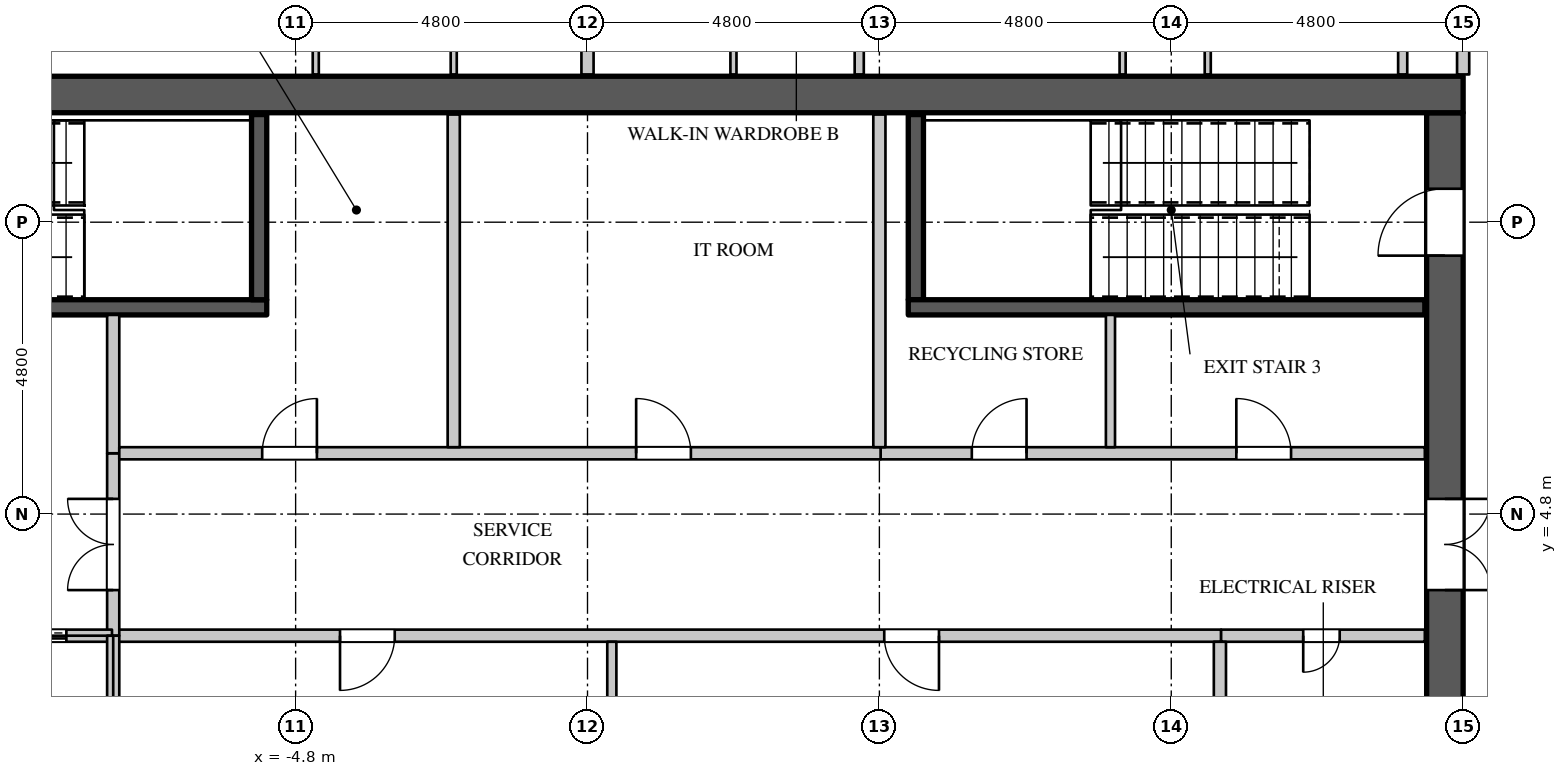
"""IFC4 building model, lengths in metres.
Left out: names, types, materials, properties, quantities, classifications, styles, units other than length and angle.
Written with IfcOpenShell. Run it as: python <this file> out.ifc"""

import sys

from ifc_helpers import new_model, si_unit, direction, frame, frame_2d, origin, place, context, subcontext, project, spatial, rectangle, extrude, element, fill, save


model = new_model("IFC4")
c1 = context("Model", 3, precision=1e-05, world=origin(), true_north=direction((0.0, 1.0)))
c2 = subcontext(c1, "Body", "Model", "MODEL_VIEW")
j1 = project(units=[si_unit("LENGTHUNIT", "METRE"), si_unit("PLANEANGLEUNIT", "RADIAN")], contexts=[c1])
p1 = place(None, origin())
s1 = spatial("IfcSite", under=j1, at=p1, CompositionType="ELEMENT")
p2 = place(p1, origin())
s2 = spatial("IfcBuilding", under=s1, at=p2, CompositionType="ELEMENT")
p3 = place(p2, frame((0.0, 0.0, 281.1)))
s3 = spatial("IfcBuildingStorey", under=s2, at=p3, CompositionType="ELEMENT", Elevation=281.1)
p4 = place(p3, frame((-14.4, 11.7, 0.0), z_axis=(0.0, 0.0, 1.0), x_axis=(1.0, 0.0, 0.0)))
e1 = element("IfcWall", 1, at=p4, inside=s3, PredefinedType="SHEAR", context=c2, shape_type="SweptSolid", body=[
    extrude(rectangle(XDim=28.8, YDim=0.6, at=frame_2d((14.4, 0.0))), origin(), (0.0, 0.0, 1.0), 4.2),
])
p5 = place(p3, frame((14.1, -11.4, 0.0), z_axis=(0.0, 0.0, 1.0), x_axis=(0.0, 1.0, 0.0)))
e2 = element("IfcWall", 2, at=p5, inside=s3, PredefinedType="SHEAR", context=c2, shape_type="SweptSolid", body=[
    extrude(rectangle(XDim=22.8, YDim=0.6, at=frame_2d((11.4, 0.0))), origin(), (0.0, 0.0, 1.0), 4.2),
])
p6 = place(p5, frame((20.45, 0.0, 0.0)))
e3 = element("IfcOpeningElement", 3, at=p6, cuts=e2, PredefinedType="OPENING", context=c2, shape_type="SweptSolid", body=[
    extrude(rectangle(XDim=1.1, YDim=2.2, at=frame_2d((0.55, 1.1))), frame((0.0, 0.31, 0.0), z_axis=(0.0, -1.0, 0.0), x_axis=(1.0, 0.0, 0.0)), (0.0, 0.0, 1.0), 0.62),
])
p7 = place(p5, frame((1.25, 0.0, 0.0)))
e4 = element("IfcOpeningElement", 4, at=p7, cuts=e2, PredefinedType="OPENING", context=c2, shape_type="SweptSolid", body=[
    extrude(rectangle(XDim=1.1, YDim=2.2, at=frame_2d((0.55, 1.1))), frame((0.0, 0.31, 0.0), z_axis=(0.0, -1.0, 0.0), x_axis=(1.0, 0.0, 0.0)), (0.0, 0.0, 1.0), 0.62),
])
p8 = place(p5, frame((14.95, 0.0, 0.0)))
e5 = element("IfcOpeningElement", 5, at=p8, cuts=e2, PredefinedType="OPENING", context=c2, shape_type="SweptSolid", body=[
    extrude(rectangle(XDim=1.5, YDim=2.4, at=frame_2d((0.75, 1.2))), frame((0.0, 0.31, 0.0), z_axis=(0.0, -1.0, 0.0), x_axis=(1.0, 0.0, 0.0)), (0.0, 0.0, 1.0), 0.62),
])
p9 = place(p5, frame((6.35, 0.0, 0.0)))
e6 = element("IfcOpeningElement", 6, at=p9, cuts=e2, PredefinedType="OPENING", context=c2, shape_type="SweptSolid", body=[
    extrude(rectangle(XDim=1.5, YDim=2.4, at=frame_2d((0.75, 1.2))), frame((0.0, 0.31, 0.0), z_axis=(0.0, -1.0, 0.0), x_axis=(1.0, 0.0, 0.0)), (0.0, 0.0, 1.0), 0.62),
])
p10 = place(p3, frame((-7.82, 2.8, 0.0), z_axis=(0.0, 0.0, 1.0), x_axis=(1.0, 0.0, 0.0)))
e7 = element("IfcWall", 7, at=p10, inside=s3, PredefinedType="PARTITIONING", context=c2, shape_type="SweptSolid", body=[
    extrude(rectangle(XDim=18.24, YDim=0.2, at=frame_2d((9.12, 0.0))), origin(), (0.0, 0.0, 1.0), 3.95),
])
p11 = place(p10, frame((3.75, 0.0, 0.0)))
e8 = element("IfcOpeningElement", 8, at=p11, cuts=e7, PredefinedType="OPENING", context=c2, shape_type="SweptSolid", body=[
    extrude(rectangle(XDim=0.9, YDim=2.2, at=frame_2d((0.45, 1.1))), frame((0.0, 0.11, 0.0), z_axis=(0.0, -1.0, 0.0), x_axis=(1.0, 0.0, 0.0)), (0.0, 0.0, 1.0), 0.22),
])
p12 = place(p10, frame((12.7, 0.0, 0.0)))
e9 = element("IfcOpeningElement", 9, at=p12, cuts=e7, PredefinedType="OPENING", context=c2, shape_type="SweptSolid", body=[
    extrude(rectangle(XDim=0.9, YDim=2.2, at=frame_2d((0.45, 1.1))), frame((0.0, 0.11, 0.0), z_axis=(0.0, -1.0, 0.0), x_axis=(1.0, 0.0, 0.0)), (0.0, 0.0, 1.0), 0.22),
])
p13 = place(p3, frame((-7.8, 2.8, 0.0), z_axis=(0.0, 0.0, 1.0), x_axis=(0.0, 1.0, 0.0)))
e10 = element("IfcWall", 10, at=p13, inside=s3, PredefinedType="PARTITIONING", context=c2, shape_type="SweptSolid", body=[
    extrude(rectangle(XDim=3.0, YDim=0.2, at=frame_2d((1.5, 0.0))), origin(), (0.0, 0.0, 1.0), 3.95),
])
p14 = place(p13, frame((0.75, 0.0, 0.0)))
e11 = element("IfcOpeningElement", 11, at=p14, cuts=e10, PredefinedType="OPENING", context=c2, shape_type="SweptSolid", body=[
    extrude(rectangle(XDim=1.5, YDim=2.4, at=frame_2d((0.75, 1.2))), frame((0.0, 0.11, 0.0), z_axis=(0.0, -1.0, 0.0), x_axis=(1.0, 0.0, 0.0)), (0.0, 0.0, 1.0), 0.22),
])
p15 = place(p3, frame((4.82, 5.8, 0.0), z_axis=(0.0, 0.0, 1.0), x_axis=(1.0, 0.0, 0.0)))
e12 = element("IfcWall", 12, at=p15, inside=s3, PredefinedType="PARTITIONING", context=c2, shape_type="SweptSolid", body=[
    extrude(rectangle(XDim=8.95, YDim=0.2, at=frame_2d((4.475, 0.0))), origin(), (0.0, 0.0, 1.0), 3.95),
])
p16 = place(p15, frame((1.5, 0.0, 0.0)))
e13 = element("IfcOpeningElement", 13, at=p16, cuts=e12, PredefinedType="OPENING", context=c2, shape_type="SweptSolid", body=[
    extrude(rectangle(XDim=0.9, YDim=2.2, at=frame_2d((0.45, 1.1))), frame((0.0, 0.11, 0.0), z_axis=(0.0, -1.0, 0.0), x_axis=(1.0, 0.0, 0.0)), (0.0, 0.0, 1.0), 0.22),
])
p17 = place(p15, frame((5.85, 0.0, 0.0)))
e14 = element("IfcOpeningElement", 14, at=p17, cuts=e12, PredefinedType="OPENING", context=c2, shape_type="SweptSolid", body=[
    extrude(rectangle(XDim=0.9, YDim=2.2, at=frame_2d((0.45, 1.1))), frame((0.0, 0.11, 0.0), z_axis=(0.0, -1.0, 0.0), x_axis=(1.0, 0.0, 0.0)), (0.0, 0.0, 1.0), 0.22),
])
p18 = place(p3, frame((14.4, 12.03, 0.0), z_axis=(0.0, 0.0, 1.0), x_axis=(0.0, 1.0, 0.0)))
e15 = element("IfcWall", 15, at=p18, inside=s3, PredefinedType="PARTITIONING", context=c2, shape_type="SweptSolid", body=[
    extrude(rectangle(XDim=2.27, YDim=0.2, at=frame_2d((1.135, 0.0))), origin(), (0.0, 0.0, 1.0), 3.95),
])
p19 = place(p3, frame((0.4, 0.1, 0.0), z_axis=(0.0, 0.0, 1.0), x_axis=(0.0, 1.0, 0.0)))
e16 = element("IfcWall", 16, at=p19, inside=s3, PredefinedType="PARTITIONING", context=c2, shape_type="SweptSolid", body=[
    extrude(rectangle(XDim=2.6, YDim=0.15, at=frame_2d((1.3, 0.0))), origin(), (0.0, 0.0, 1.0), 3.95),
])
p20 = place(p3, frame((4.469, 12.03, 0.0), z_axis=(0.0, 0.0, 1.0), x_axis=(0.0, 1.0, 0.0)))
e17 = element("IfcWall", 17, at=p20, inside=s3, PredefinedType="PARTITIONING", context=c2, shape_type="SweptSolid", body=[
    extrude(rectangle(XDim=13.92, YDim=0.15, at=frame_2d((6.96, 0.0))), origin(), (0.0, 0.0, 1.0), 3.3),
])
p21 = place(p20, frame((9.55, 0.0, 0.0)))
e18 = element("IfcOpeningElement", 18, at=p21, cuts=e17, PredefinedType="OPENING", context=c2, shape_type="SweptSolid", body=[
    extrude(rectangle(XDim=0.95, YDim=2.2, at=frame_2d((0.475, 1.1))), frame((0.0, 0.085, 0.0), z_axis=(0.0, -1.0, 0.0), x_axis=(1.0, 0.0, 0.0)), (0.0, 0.0, 1.0), 0.17),
])
p22 = place(p3, frame((8.6, 5.9, 0.0), z_axis=(0.0, 0.0, 1.0), x_axis=(0.0, 1.0, 0.0)))
e19 = element("IfcWall", 19, at=p22, inside=s3, PredefinedType="PARTITIONING", context=c2, shape_type="SweptSolid", body=[
    extrude(rectangle(XDim=2.175, YDim=0.15, at=frame_2d((1.087, 0.0))), origin(), (0.0, 0.0, 1.0), 3.95),
])
p23 = place(p3, frame((13.406, 12.03, 0.0), z_axis=(0.0, 0.0, 1.0), x_axis=(0.0, 1.0, 0.0)))
e20 = element("IfcWall", 20, at=p23, inside=s3, PredefinedType="PARTITIONING", context=c2, shape_type="SweptSolid", body=[
    extrude(rectangle(XDim=13.701, YDim=0.15, at=frame_2d((6.851, 0.0))), origin(), (0.0, 0.0, 1.0), 3.3),
])
p24 = place(p23, frame((2.5, 0.0, 0.0)))
e21 = element("IfcOpeningElement", 21, at=p24, cuts=e20, PredefinedType="OPENING", context=c2, shape_type="SweptSolid", body=[
    extrude(rectangle(XDim=1.5, YDim=2.2, at=frame_2d((0.75, 1.1))), frame((0.0, 0.085, 0.0), z_axis=(0.0, -1.0, 0.0), x_axis=(1.0, 0.0, 0.0)), (0.0, 0.0, 1.0), 0.17),
])
p25 = place(p3, frame((0.0, 12.03, 0.0), z_axis=(0.0, 0.0, 1.0), x_axis=(0.0, 1.0, 0.0)))
e22 = element("IfcWall", 22, at=p25, inside=s3, PredefinedType="PARTITIONING", context=c2, shape_type="SweptSolid", body=[
    extrude(rectangle(XDim=14.425, YDim=0.2, at=frame_2d((7.212, 0.0))), origin(), (0.0, 0.0, 1.0), 3.95),
])
p26 = place(p3, frame((-7.8, 5.8, 0.0), z_axis=(0.0, 0.0, 1.0), x_axis=(0.0, 1.0, 0.0)))
e23 = element("IfcWall", 23, at=p26, inside=s3, PredefinedType="PARTITIONING", context=c2, shape_type="SweptSolid", body=[
    extrude(rectangle(XDim=2.275, YDim=0.2, at=frame_2d((1.137, 0.0))), origin(), (0.0, 0.0, 1.0), 3.95),
])
p27 = place(p3, frame((-7.7, 5.8, 0.0), z_axis=(0.0, 0.0, 1.0), x_axis=(1.0, 0.0, 0.0)))
e24 = element("IfcWall", 24, at=p27, inside=s3, PredefinedType="PARTITIONING", context=c2, shape_type="SweptSolid", body=[
    extrude(rectangle(XDim=12.52, YDim=0.2, at=frame_2d((6.26, 0.0))), origin(), (0.0, 0.0, 1.0), 3.95),
])
p28 = place(p27, frame((2.35, 0.0, 0.0)))
e25 = element("IfcOpeningElement", 25, at=p28, cuts=e24, PredefinedType="OPENING", context=c2, shape_type="SweptSolid", body=[
    extrude(rectangle(XDim=0.9, YDim=2.2, at=frame_2d((0.45, 1.1))), frame((0.0, 0.11, 0.0), z_axis=(0.0, -1.0, 0.0), x_axis=(1.0, 0.0, 0.0)), (0.0, 0.0, 1.0), 0.22),
])
p29 = place(p27, frame((8.5, 0.0, 0.0)))
e26 = element("IfcOpeningElement", 26, at=p29, cuts=e24, PredefinedType="OPENING", context=c2, shape_type="SweptSolid", body=[
    extrude(rectangle(XDim=0.9, YDim=2.2, at=frame_2d((0.45, 1.1))), frame((0.0, 0.11, 0.0), z_axis=(0.0, -1.0, 0.0), x_axis=(1.0, 0.0, 0.0)), (0.0, 0.0, 1.0), 0.22),
])
for number, where, z_axis, x_axis in (
    (27, (-2.2, 5.9, 0.0), (0.0, 0.0, 1.0), (0.0, 1.0, 0.0)),
    (28, (4.8, 5.9, 0.0), (0.0, 0.0, 1.0), (0.0, 1.0, 0.0)),
):
    element("IfcWall", number, at=place(p3, frame(where, z_axis=z_axis, x_axis=x_axis)), inside=s3, PredefinedType="PARTITIONING", context=c2, shape_type="SweptSolid", body=[
        extrude(rectangle(XDim=5.47, YDim=0.2, at=frame_2d((2.735, 0.0))), origin(), (0.0, 0.0, 1.0), 3.95),
    ])
p30 = place(p3, frame((10.42, 2.8, 0.0), z_axis=(0.0, 0.0, 1.0), x_axis=(1.0, 0.0, 0.0)))
e29 = element("IfcWall", 29, at=p30, inside=s3, PredefinedType="PARTITIONING", context=c2, shape_type="SweptSolid", body=[
    extrude(rectangle(XDim=3.35, YDim=0.2, at=frame_2d((1.675, 0.0))), origin(), (0.0, 0.0, 1.0), 3.95),
])
p31 = place(p30, frame((1.35, 0.0, 0.0)))
e30 = element("IfcOpeningElement", 30, at=p31, cuts=e29, PredefinedType="OPENING", context=c2, shape_type="SweptSolid", body=[
    extrude(rectangle(XDim=0.6, YDim=2.0, at=frame_2d((0.3, 1.0))), frame((0.0, 0.11, 0.0), z_axis=(0.0, -1.0, 0.0), x_axis=(1.0, 0.0, 0.0)), (0.0, 0.0, 1.0), 0.22),
])
p32 = place(p3, frame((10.4, 0.1, 0.0), z_axis=(0.0, 0.0, 1.0), x_axis=(0.0, 1.0, 0.0)))
e31 = element("IfcWall", 31, at=p32, inside=s3, PredefinedType="PARTITIONING", context=c2, shape_type="SweptSolid", body=[
    extrude(rectangle(XDim=2.6, YDim=0.2, at=frame_2d((1.3, 0.0))), origin(), (0.0, 0.0, 1.0), 3.95),
])
p33 = place(p3, frame((-13.77, 2.8, 0.0), z_axis=(0.0, 0.0, 1.0), x_axis=(1.0, 0.0, 0.0)))
e32 = element("IfcWall", 32, at=p33, inside=s3, PredefinedType="PARTITIONING", context=c2, shape_type="SweptSolid", body=[
    extrude(rectangle(XDim=5.95, YDim=0.2, at=frame_2d((2.975, 0.0))), origin(), (0.0, 0.0, 1.0), 3.95),
])
p34 = place(p33, frame((1.1, 0.0, 0.0)))
e33 = element("IfcOpeningElement", 33, at=p34, cuts=e32, PredefinedType="OPENING", context=c2, shape_type="SweptSolid", body=[
    extrude(rectangle(XDim=1.1, YDim=2.2, at=frame_2d((0.55, 1.1))), frame((0.0, 0.11, 0.0), z_axis=(0.0, -1.0, 0.0), x_axis=(1.0, 0.0, 0.0)), (0.0, 0.0, 1.0), 0.22),
])
p35 = place(p33, frame((4.1, 0.0, 0.0)))
e34 = element("IfcOpeningElement", 34, at=p35, cuts=e32, PredefinedType="OPENING", context=c2, shape_type="SweptSolid", body=[
    extrude(rectangle(XDim=1.1, YDim=2.2, at=frame_2d((0.55, 1.1))), frame((0.0, 0.11, 0.0), z_axis=(0.0, -1.0, 0.0), x_axis=(1.0, 0.0, 0.0)), (0.0, 0.0, 1.0), 0.22),
])
p36 = place(p3, frame((-7.8, 0.0, 0.0), z_axis=(0.0, 0.0, 1.0), x_axis=(0.0, 1.0, 0.0)))
e35 = element("IfcWall", 35, at=p36, inside=s3, PredefinedType="PARTITIONING", context=c2, shape_type="SweptSolid", body=[
    extrude(rectangle(XDim=2.8, YDim=0.2, at=frame_2d((1.4, 0.0))), origin(), (0.0, 0.0, 1.0), 3.95),
])
p37 = place(p3, frame((-13.77, 8.2, 0.0), z_axis=(0.0, 0.0, 1.0), x_axis=(1.0, 0.0, 0.0)))
e36 = element("IfcWall", 36, at=p37, inside=s3, PredefinedType="SHEAR", context=c2, shape_type="SweptSolid", body=[
    extrude(rectangle(XDim=8.495, YDim=0.25, at=frame_2d((4.248, 0.0))), origin(), (0.0, 0.0, 1.0), 3.95),
])
p38 = place(p37, frame((0.15, 0.0, 0.0)))
e37 = element("IfcOpeningElement", 37, at=p38, cuts=e36, PredefinedType="OPENING", context=c2, shape_type="SweptSolid", body=[
    extrude(rectangle(XDim=1.1, YDim=2.2, at=frame_2d((0.55, 1.1))), frame((0.0, 0.135, 0.0), z_axis=(0.0, -1.0, 0.0), x_axis=(1.0, 0.0, 0.0)), (0.0, 0.0, 1.0), 0.27),
])
for number, where, z_axis, x_axis in (
    (38, (-5.4, 8.325, 0.0), (0.0, 0.0, 1.0), (0.0, 1.0, 0.0)),
    (39, (5.4, 8.325, 0.0), (0.0, 0.0, 1.0), (0.0, 1.0, 0.0)),
):
    element("IfcWall", number, at=place(p3, frame(where, z_axis=z_axis, x_axis=x_axis)), inside=s3, PredefinedType="SHEAR", context=c2, shape_type="SweptSolid", body=[
        extrude(rectangle(XDim=3.045, YDim=0.25, at=frame_2d((1.522, 0.0))), origin(), (0.0, 0.0, 1.0), 3.95),
    ])
p39 = place(p3, frame((5.275, 8.2, 0.0), z_axis=(0.0, 0.0, 1.0), x_axis=(1.0, 0.0, 0.0)))
e40 = element("IfcWall", 40, at=p39, inside=s3, PredefinedType="SHEAR", context=c2, shape_type="SweptSolid", body=[
    extrude(rectangle(XDim=8.495, YDim=0.25, at=frame_2d((4.248, 0.0))), origin(), (0.0, 0.0, 1.0), 3.95),
])
p40 = place(p3, frame((-4.469, 12.03, 0.0), z_axis=(0.0, 0.0, 1.0), x_axis=(0.0, 1.0, 0.0)))
e41 = element("IfcWall", 41, at=p40, inside=s3, PredefinedType="PARTITIONING", context=c2, shape_type="SweptSolid", body=[
    extrude(rectangle(XDim=6.35, YDim=0.1, at=frame_2d((3.175, 0.0))), origin(), (0.0, 0.0, 1.0), 3.3),
])
p41 = place(p3, frame((-2.2, 12.03, 0.0), z_axis=(0.0, 0.0, 1.0), x_axis=(0.0, 1.0, 0.0)))
e42 = element("IfcWall", 42, at=p41, inside=s3, PredefinedType="PARTITIONING", context=c2, shape_type="SweptSolid", body=[
    extrude(rectangle(XDim=6.32, YDim=0.1, at=frame_2d((3.16, 0.0))), origin(), (0.0, 0.0, 1.0), 3.95),
])
p42 = place(p3, frame((2.4, 12.03, 0.0), z_axis=(0.0, 0.0, 1.0), x_axis=(0.0, 1.0, 0.0)))
e43 = element("IfcWall", 43, at=p42, inside=s3, PredefinedType="PARTITIONING", context=c2, shape_type="SweptSolid", body=[
    extrude(rectangle(XDim=5.695, YDim=0.1, at=frame_2d((2.848, 0.0))), origin(), (0.0, 0.0, 1.0), 3.95),
])
p43 = place(p3, frame((8.8, 12.03, 0.0), z_axis=(0.0, 0.0, 1.0), x_axis=(0.0, 1.0, 0.0)))
e44 = element("IfcWall", 44, at=p43, inside=s3, PredefinedType="PARTITIONING", context=c2, shape_type="SweptSolid", body=[
    extrude(rectangle(XDim=6.195, YDim=0.1, at=frame_2d((3.098, 0.0))), origin(), (0.0, 0.0, 1.0), 3.95),
])
p44 = place(p3, frame((10.2, 12.03, 0.0), z_axis=(0.0, 0.0, 1.0), x_axis=(0.0, 1.0, 0.0)))
e45 = element("IfcWall", 45, at=p44, inside=s3, PredefinedType="PARTITIONING", context=c2, shape_type="SweptSolid", body=[
    extrude(rectangle(XDim=5.245, YDim=0.1, at=frame_2d((2.623, 0.0))), origin(), (0.0, 0.0, 1.0), 3.95),
])
p45 = place(p44, frame((2.15, 0.0, 0.0)))
e46 = element("IfcOpeningElement", 46, at=p45, cuts=e45, PredefinedType="OPENING", context=c2, shape_type="SweptSolid", body=[
    extrude(rectangle(XDim=0.9, YDim=2.2, at=frame_2d((0.45, 1.1))), frame((0.0, 0.06, 0.0), z_axis=(0.0, -1.0, 0.0), x_axis=(1.0, 0.0, 0.0)), (0.0, 0.0, 1.0), 0.12),
])
p46 = place(p31, origin())
e47 = element("IfcDoor", 47, at=p46, inside=s3, OperationType="SINGLE_SWING_RIGHT", PredefinedType="DOOR", context=c2, shape_type="SweptSolid", body=[
    extrude(rectangle(XDim=0.6, YDim=2.0, at=frame_2d((0.3, 1.0))), frame((0.0, 0.025, 0.0), z_axis=(0.0, -1.0, 0.0), x_axis=(1.0, 0.0, 0.0)), (0.0, 0.0, 1.0), 0.05),
])
fill(e30, e47)
p47 = place(p28, origin())
e48 = element("IfcDoor", 48, at=p47, inside=s3, OperationType="SINGLE_SWING_RIGHT", PredefinedType="DOOR", context=c2, shape_type="SweptSolid", body=[
    extrude(rectangle(XDim=0.9, YDim=2.2, at=frame_2d((0.45, 1.1))), frame((0.0, 0.025, 0.0), z_axis=(0.0, -1.0, 0.0), x_axis=(1.0, 0.0, 0.0)), (0.0, 0.0, 1.0), 0.05),
])
fill(e25, e48)
p48 = place(p29, origin())
e49 = element("IfcDoor", 49, at=p48, inside=s3, OperationType="SINGLE_SWING_LEFT", PredefinedType="DOOR", context=c2, shape_type="SweptSolid", body=[
    extrude(rectangle(XDim=0.9, YDim=2.2, at=frame_2d((0.45, 1.1))), frame((0.0, 0.025, 0.0), z_axis=(0.0, -1.0, 0.0), x_axis=(1.0, 0.0, 0.0)), (0.0, 0.0, 1.0), 0.05),
])
fill(e26, e49)
p49 = place(p16, origin())
e50 = element("IfcDoor", 50, at=p49, inside=s3, OperationType="SINGLE_SWING_RIGHT", PredefinedType="DOOR", context=c2, shape_type="SweptSolid", body=[
    extrude(rectangle(XDim=0.9, YDim=2.2, at=frame_2d((0.45, 1.1))), frame((0.0, 0.025, 0.0), z_axis=(0.0, -1.0, 0.0), x_axis=(1.0, 0.0, 0.0)), (0.0, 0.0, 1.0), 0.05),
])
fill(e13, e50)
p50 = place(p17, origin())
e51 = element("IfcDoor", 51, at=p50, inside=s3, OperationType="SINGLE_SWING_LEFT", PredefinedType="DOOR", context=c2, shape_type="SweptSolid", body=[
    extrude(rectangle(XDim=0.9, YDim=2.2, at=frame_2d((0.45, 1.1))), frame((0.0, 0.025, 0.0), z_axis=(0.0, -1.0, 0.0), x_axis=(1.0, 0.0, 0.0)), (0.0, 0.0, 1.0), 0.05),
])
fill(e14, e51)
p51 = place(p11, origin())
e52 = element("IfcDoor", 52, at=p51, inside=s3, OperationType="SINGLE_SWING_RIGHT", PredefinedType="DOOR", context=c2, shape_type="SweptSolid", body=[
    extrude(rectangle(XDim=0.9, YDim=2.2, at=frame_2d((0.45, 1.1))), frame((0.0, 0.025, 0.0), z_axis=(0.0, -1.0, 0.0), x_axis=(1.0, 0.0, 0.0)), (0.0, 0.0, 1.0), 0.05),
])
fill(e8, e52)
p52 = place(p12, origin())
e53 = element("IfcDoor", 53, at=p52, inside=s3, OperationType="SINGLE_SWING_LEFT", PredefinedType="DOOR", context=c2, shape_type="SweptSolid", body=[
    extrude(rectangle(XDim=0.9, YDim=2.2, at=frame_2d((0.45, 1.1))), frame((0.0, 0.025, 0.0), z_axis=(0.0, -1.0, 0.0), x_axis=(1.0, 0.0, 0.0)), (0.0, 0.0, 1.0), 0.05),
])
fill(e9, e53)
p53 = place(p35, origin())
e54 = element("IfcDoor", 54, at=p53, inside=s3, OperationType="DOUBLE_DOOR_SLIDING", PredefinedType="DOOR", context=c2, shape_type="SweptSolid", body=[
    extrude(rectangle(XDim=1.1, YDim=2.2, at=frame_2d((0.55, 1.1))), frame((0.0, 0.025, 0.0), z_axis=(0.0, -1.0, 0.0), x_axis=(1.0, 0.0, 0.0)), (0.0, 0.0, 1.0), 0.05),
])
fill(e34, e54)
p54 = place(p14, origin())
e55 = element("IfcDoor", 55, at=p54, inside=s3, OperationType="DOUBLE_DOOR_SINGLE_SWING", PredefinedType="DOOR", context=c2, shape_type="SweptSolid", body=[
    extrude(rectangle(XDim=1.5, YDim=2.4, at=frame_2d((0.75, 1.2))), frame((0.0, 0.025, 0.0), z_axis=(0.0, -1.0, 0.0), x_axis=(1.0, 0.0, 0.0)), (0.0, 0.0, 1.0), 0.05),
])
fill(e11, e55)
p55 = place(p6, origin())
e56 = element("IfcDoor", 56, at=p55, inside=s3, OperationType="SINGLE_SWING_LEFT", PredefinedType="DOOR", context=c2, shape_type="SweptSolid", body=[
    extrude(rectangle(XDim=1.1, YDim=2.2, at=frame_2d((0.55, 1.1))), frame((0.0, 0.295, 0.0), z_axis=(0.0, -1.0, 0.0), x_axis=(1.0, 0.0, 0.0)), (0.0, 0.0, 1.0), 0.05),
])
fill(e3, e56)
p56 = place(p8, origin())
e57 = element("IfcDoor", 57, at=p56, inside=s3, OperationType="DOUBLE_DOOR_SINGLE_SWING", PredefinedType="DOOR", context=c2, shape_type="SweptSolid", body=[
    extrude(rectangle(XDim=1.5, YDim=2.4, at=frame_2d((0.75, 1.2))), frame((0.0, -0.245, 0.0), z_axis=(0.0, -1.0, 0.0), x_axis=(1.0, 0.0, 0.0)), (0.0, 0.0, 1.0), 0.05),
])
fill(e5, e57)
save(model, sys.argv[1])
